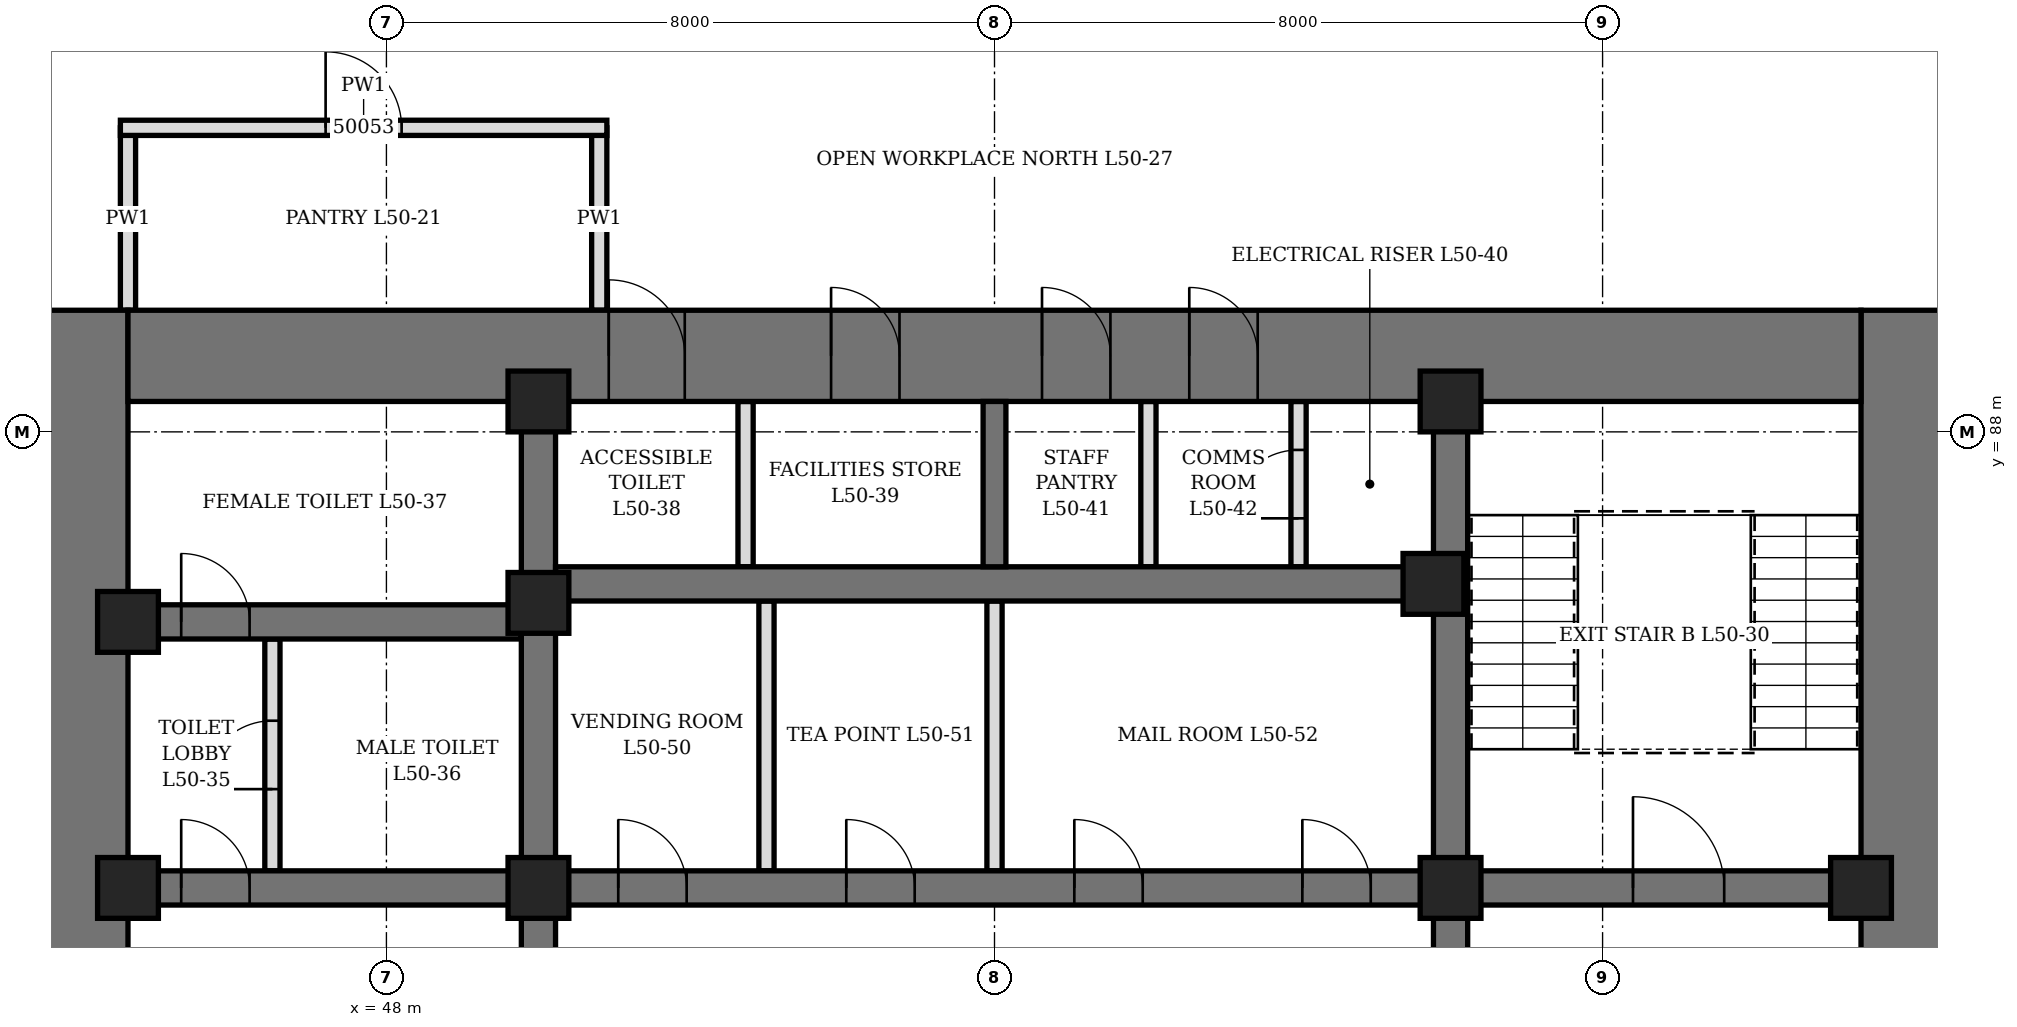
"""IFC4 building model, lengths in metres.
Left out: names, types, materials, properties, quantities, classifications, styles, units other than length and angle.
Written with IfcOpenShell. Run it as: python <this file> out.ifc"""

import sys

from ifc_helpers import new_model, si_unit, direction, frame, frame_2d, origin, origin_2d, place, context, subcontext, project, spatial, rectangle, hollow_rectangle, extrude, element, fill, save


model = new_model("IFC4")
c1 = context("Model", 3, precision=1e-05, world=origin(), true_north=direction((0.0, 1.0)))
c2 = subcontext(c1, "Body", "Model", "MODEL_VIEW")
j1 = project(units=[si_unit("LENGTHUNIT", "METRE"), si_unit("PLANEANGLEUNIT", "RADIAN")], contexts=[c1])
p1 = place(None, origin())
s1 = spatial("IfcSite", under=j1, at=p1, CompositionType="ELEMENT")
p2 = place(p1, origin())
s2 = spatial("IfcBuilding", under=s1, at=p2, CompositionType="ELEMENT")
p3 = place(p2, frame((0.0, 0.0, 223.3)))
s3 = spatial("IfcBuildingStorey", under=s2, at=p3, CompositionType="ELEMENT", Elevation=223.3)
p4 = place(p3, frame((44.0, 70.4, 0.0), z_axis=(0.0, 0.0, 1.0), x_axis=(0.0, 1.0, 0.0)))
e1 = element("IfcWall", 1, at=p4, inside=s3, PredefinedType="SHEAR", context=c2, shape_type="SweptSolid", body=[
    extrude(rectangle(XDim=19.2, YDim=1.2, at=frame_2d((9.6, 0.0))), origin(), (0.0, 0.0, 1.0), 4.2),
])
p5 = place(p4, frame((8.6, 0.0, 0.0)))
e2 = element("IfcOpeningElement", 2, at=p5, cuts=e1, PredefinedType="OPENING", context=c2, shape_type="SweptSolid", body=[
    extrude(rectangle(XDim=2.0, YDim=2.4, at=frame_2d((1.0, 1.2))), frame((0.0, 0.61, 0.0), z_axis=(0.0, -1.0, 0.0), x_axis=(1.0, 0.0, 0.0)), (0.0, 0.0, 1.0), 1.22),
])
p6 = place(p3, frame((68.0, 70.4, 0.0), z_axis=(0.0, 0.0, 1.0), x_axis=(0.0, 1.0, 0.0)))
e3 = element("IfcWall", 3, at=p6, inside=s3, PredefinedType="SHEAR", context=c2, shape_type="SweptSolid", body=[
    extrude(rectangle(XDim=19.2, YDim=1.2, at=frame_2d((9.6, 0.0))), origin(), (0.0, 0.0, 1.0), 4.2),
])
p7 = place(p6, frame((8.6, 0.0, 0.0)))
e4 = element("IfcOpeningElement", 4, at=p7, cuts=e3, PredefinedType="OPENING", context=c2, shape_type="SweptSolid", body=[
    extrude(rectangle(XDim=2.0, YDim=2.4, at=frame_2d((1.0, 1.2))), frame((0.0, 0.61, 0.0), z_axis=(0.0, -1.0, 0.0), x_axis=(1.0, 0.0, 0.0)), (0.0, 0.0, 1.0), 1.22),
])
p8 = place(p3, frame((44.6, 89.0, 0.0), z_axis=(0.0, 0.0, 1.0), x_axis=(1.0, 0.0, 0.0)))
e5 = element("IfcWall", 5, at=p8, inside=s3, PredefinedType="SHEAR", context=c2, shape_type="SweptSolid", body=[
    extrude(rectangle(XDim=22.8, YDim=1.2, at=frame_2d((11.4, 0.0))), origin(), (0.0, 0.0, 1.0), 4.2),
])
p9 = place(p8, frame((6.325, 0.0, 0.0)))
e6 = element("IfcOpeningElement", 6, at=p9, cuts=e5, PredefinedType="OPENING", context=c2, shape_type="SweptSolid", body=[
    extrude(rectangle(XDim=1.0, YDim=2.1, at=frame_2d((0.5, 1.05))), frame((0.0, 0.61, 0.0), z_axis=(0.0, -1.0, 0.0), x_axis=(1.0, 0.0, 0.0)), (0.0, 0.0, 1.0), 1.22),
])
p10 = place(p8, frame((9.25, 0.0, 0.0)))
e7 = element("IfcOpeningElement", 7, at=p10, cuts=e5, PredefinedType="OPENING", context=c2, shape_type="SweptSolid", body=[
    extrude(rectangle(XDim=0.9, YDim=2.1, at=frame_2d((0.45, 1.05))), frame((0.0, 0.61, 0.0), z_axis=(0.0, -1.0, 0.0), x_axis=(1.0, 0.0, 0.0)), (0.0, 0.0, 1.0), 1.22),
])
p11 = place(p8, frame((12.025, 0.0, 0.0)))
e8 = element("IfcOpeningElement", 8, at=p11, cuts=e5, PredefinedType="OPENING", context=c2, shape_type="SweptSolid", body=[
    extrude(rectangle(XDim=0.9, YDim=2.1, at=frame_2d((0.45, 1.05))), frame((0.0, 0.61, 0.0), z_axis=(0.0, -1.0, 0.0), x_axis=(1.0, 0.0, 0.0)), (0.0, 0.0, 1.0), 1.22),
])
p12 = place(p8, frame((13.962, 0.0, 0.0)))
e9 = element("IfcOpeningElement", 9, at=p12, cuts=e5, PredefinedType="OPENING", context=c2, shape_type="SweptSolid", body=[
    extrude(rectangle(XDim=0.9, YDim=2.1, at=frame_2d((0.45, 1.05))), frame((0.0, 0.61, 0.0), z_axis=(0.0, -1.0, 0.0), x_axis=(1.0, 0.0, 0.0)), (0.0, 0.0, 1.0), 1.22),
])
p13 = place(p3, frame((50.0, 71.6, 0.0), z_axis=(0.0, 0.0, 1.0), x_axis=(0.0, 1.0, 0.0)))
e10 = element("IfcWall", 10, at=p13, inside=s3, PredefinedType="SHEAR", context=c2, shape_type="SweptSolid", body=[
    extrude(rectangle(XDim=16.8, YDim=0.45, at=frame_2d((8.4, 0.0))), origin(), (0.0, 0.0, 1.0), 4.2),
])
p14 = place(p13, frame((7.5, 0.0, 0.0)))
e11 = element("IfcOpeningElement", 11, at=p14, cuts=e10, PredefinedType="OPENING", context=c2, shape_type="SweptSolid", body=[
    extrude(rectangle(XDim=1.8, YDim=2.4, at=frame_2d((0.9, 1.2))), frame((0.0, 0.235, 0.0), z_axis=(0.0, -1.0, 0.0), x_axis=(1.0, 0.0, 0.0)), (0.0, 0.0, 1.0), 0.47),
])
p15 = place(p3, frame((62.0, 71.6, 0.0), z_axis=(0.0, 0.0, 1.0), x_axis=(0.0, 1.0, 0.0)))
e12 = element("IfcWall", 12, at=p15, inside=s3, PredefinedType="SHEAR", context=c2, shape_type="SweptSolid", body=[
    extrude(rectangle(XDim=16.8, YDim=0.45, at=frame_2d((8.4, 0.0))), origin(), (0.0, 0.0, 1.0), 4.2),
])
p16 = place(p15, frame((7.5, 0.0, 0.0)))
e13 = element("IfcOpeningElement", 13, at=p16, cuts=e12, PredefinedType="OPENING", context=c2, shape_type="SweptSolid", body=[
    extrude(rectangle(XDim=1.8, YDim=2.4, at=frame_2d((0.9, 1.2))), frame((0.0, 0.235, 0.0), z_axis=(0.0, -1.0, 0.0), x_axis=(1.0, 0.0, 0.0)), (0.0, 0.0, 1.0), 0.47),
])
p17 = place(p3, frame((44.6, 82.0, 0.0), z_axis=(0.0, 0.0, 1.0), x_axis=(1.0, 0.0, 0.0)))
e14 = element("IfcWall", 14, at=p17, inside=s3, PredefinedType="SHEAR", context=c2, shape_type="SweptSolid", body=[
    extrude(rectangle(XDim=5.175, YDim=0.45, at=frame_2d((2.587, 0.0))), origin(), (0.0, 0.0, 1.0), 4.2),
])
p18 = place(p17, frame((0.7, 0.0, 0.0)))
e15 = element("IfcOpeningElement", 15, at=p18, cuts=e14, PredefinedType="OPENING", context=c2, shape_type="SweptSolid", body=[
    extrude(rectangle(XDim=0.9, YDim=2.1, at=frame_2d((0.45, 1.05))), frame((0.0, 0.235, 0.0), z_axis=(0.0, -1.0, 0.0), x_axis=(1.0, 0.0, 0.0)), (0.0, 0.0, 1.0), 0.47),
])
p19 = place(p3, frame((44.6, 85.5, 0.0), z_axis=(0.0, 0.0, 1.0), x_axis=(1.0, 0.0, 0.0)))
e16 = element("IfcWall", 16, at=p19, inside=s3, PredefinedType="SHEAR", context=c2, shape_type="SweptSolid", body=[
    extrude(rectangle(XDim=5.175, YDim=0.45, at=frame_2d((2.587, 0.0))), origin(), (0.0, 0.0, 1.0), 4.2),
])
p20 = place(p19, frame((0.7, 0.0, 0.0)))
e17 = element("IfcOpeningElement", 17, at=p20, cuts=e16, PredefinedType="OPENING", context=c2, shape_type="SweptSolid", body=[
    extrude(rectangle(XDim=0.9, YDim=2.1, at=frame_2d((0.45, 1.05))), frame((0.0, 0.235, 0.0), z_axis=(0.0, -1.0, 0.0), x_axis=(1.0, 0.0, 0.0)), (0.0, 0.0, 1.0), 0.47),
])
p21 = place(p3, frame((62.225, 82.0, 0.0), z_axis=(0.0, 0.0, 1.0), x_axis=(1.0, 0.0, 0.0)))
e18 = element("IfcWall", 18, at=p21, inside=s3, PredefinedType="SHEAR", context=c2, shape_type="SweptSolid", body=[
    extrude(rectangle(XDim=5.175, YDim=0.45, at=frame_2d((2.587, 0.0))), origin(), (0.0, 0.0, 1.0), 4.2),
])
p22 = place(p21, frame((2.175, 0.0, 0.0)))
e19 = element("IfcOpeningElement", 19, at=p22, cuts=e18, PredefinedType="OPENING", context=c2, shape_type="SweptSolid", body=[
    extrude(rectangle(XDim=1.2, YDim=2.1, at=frame_2d((0.6, 1.05))), frame((0.0, 0.235, 0.0), z_axis=(0.0, -1.0, 0.0), x_axis=(1.0, 0.0, 0.0)), (0.0, 0.0, 1.0), 0.47),
])
p23 = place(p3, frame((50.225, 82.0, 0.0), z_axis=(0.0, 0.0, 1.0), x_axis=(1.0, 0.0, 0.0)))
e20 = element("IfcWall", 20, at=p23, inside=s3, PredefinedType="SHEAR", context=c2, shape_type="SweptSolid", body=[
    extrude(rectangle(XDim=11.55, YDim=0.45, at=frame_2d((5.775, 0.0))), origin(), (0.0, 0.0, 1.0), 4.2),
])
p24 = place(p23, frame((0.825, 0.0, 0.0)))
e21 = element("IfcOpeningElement", 21, at=p24, cuts=e20, PredefinedType="OPENING", context=c2, shape_type="SweptSolid", body=[
    extrude(rectangle(XDim=0.9, YDim=2.1, at=frame_2d((0.45, 1.05))), frame((0.0, 0.235, 0.0), z_axis=(0.0, -1.0, 0.0), x_axis=(1.0, 0.0, 0.0)), (0.0, 0.0, 1.0), 0.47),
])
p25 = place(p23, frame((3.825, 0.0, 0.0)))
e22 = element("IfcOpeningElement", 22, at=p25, cuts=e20, PredefinedType="OPENING", context=c2, shape_type="SweptSolid", body=[
    extrude(rectangle(XDim=0.9, YDim=2.1, at=frame_2d((0.45, 1.05))), frame((0.0, 0.235, 0.0), z_axis=(0.0, -1.0, 0.0), x_axis=(1.0, 0.0, 0.0)), (0.0, 0.0, 1.0), 0.47),
])
p26 = place(p23, frame((6.825, 0.0, 0.0)))
e23 = element("IfcOpeningElement", 23, at=p26, cuts=e20, PredefinedType="OPENING", context=c2, shape_type="SweptSolid", body=[
    extrude(rectangle(XDim=0.9, YDim=2.1, at=frame_2d((0.45, 1.05))), frame((0.0, 0.235, 0.0), z_axis=(0.0, -1.0, 0.0), x_axis=(1.0, 0.0, 0.0)), (0.0, 0.0, 1.0), 0.47),
])
p27 = place(p23, frame((9.825, 0.0, 0.0)))
e24 = element("IfcOpeningElement", 24, at=p27, cuts=e20, PredefinedType="OPENING", context=c2, shape_type="SweptSolid", body=[
    extrude(rectangle(XDim=0.9, YDim=2.1, at=frame_2d((0.45, 1.05))), frame((0.0, 0.235, 0.0), z_axis=(0.0, -1.0, 0.0), x_axis=(1.0, 0.0, 0.0)), (0.0, 0.0, 1.0), 0.47),
])
p28 = place(p3, frame((50.225, 86.0, 0.0), z_axis=(0.0, 0.0, 1.0), x_axis=(1.0, 0.0, 0.0)))
e25 = element("IfcWall", 25, at=p28, inside=s3, PredefinedType="SHEAR", context=c2, shape_type="SweptSolid", body=[
    extrude(rectangle(XDim=11.55, YDim=0.45, at=frame_2d((5.775, 0.0))), origin(), (0.0, 0.0, 1.0), 4.2),
])
p29 = place(p3, frame((56.0, 86.225, 0.0), z_axis=(0.0, 0.0, 1.0), x_axis=(0.0, 1.0, 0.0)))
e26 = element("IfcWall", 26, at=p29, inside=s3, PredefinedType="SHEAR", context=c2, shape_type="SweptSolid", body=[
    extrude(rectangle(XDim=2.175, YDim=0.3, at=frame_2d((1.087, 0.0))), origin(), (0.0, 0.0, 1.0), 4.2),
])
for number, where, z_axis, x_axis in (
    (27, (44.6, 82.0, 0.0), (0.0, 0.0, 1.0), (1.0, 0.0, 0.0)),
    (28, (44.6, 85.5, 0.0), (0.0, 0.0, 1.0), (1.0, 0.0, 0.0)),
    (29, (50.0, 82.0, 0.0), (0.0, 0.0, 1.0), (1.0, 0.0, 0.0)),
    (30, (50.0, 85.75, 0.0), (0.0, 0.0, 1.0), (1.0, 0.0, 0.0)),
    (31, (50.0, 88.4, 0.0), (0.0, 0.0, 1.0), (1.0, 0.0, 0.0)),
    (32, (61.775, 86.0, 0.0), (0.0, 0.0, 1.0), (1.0, 0.0, 0.0)),
    (33, (62.0, 82.0, 0.0), (0.0, 0.0, 1.0), (1.0, 0.0, 0.0)),
    (34, (62.0, 88.4, 0.0), (0.0, 0.0, 1.0), (1.0, 0.0, 0.0)),
    (35, (67.4, 82.0, 0.0), (0.0, 0.0, 1.0), (1.0, 0.0, 0.0)),
):
    element("IfcColumn", number, at=place(p3, frame(where, z_axis=z_axis, x_axis=x_axis)), inside=s3, PredefinedType="COLUMN", context=c2, shape_type="SweptSolid", body=[
        extrude(hollow_rectangle(XDim=0.8, YDim=0.8, WallThickness=0.1, at=origin_2d()), origin(), (0.0, 0.0, 1.0), 4.2),
    ])
p30 = place(p3, frame((46.5, 82.225, 0.0), z_axis=(0.0, 0.0, 1.0), x_axis=(0.0, 1.0, 0.0)))
e36 = element("IfcWall", 36, at=p30, inside=s3, PredefinedType="PARTITIONING", context=c2, shape_type="SweptSolid", body=[
    extrude(rectangle(XDim=3.05, YDim=0.2, at=frame_2d((1.525, 0.0))), origin(), (0.0, 0.0, 1.0), 4.04),
])
p31 = place(p30, frame((1.075, 0.0, 0.0)))
e37 = element("IfcOpeningElement", 37, at=p31, cuts=e36, PredefinedType="OPENING", context=c2, shape_type="SweptSolid", body=[
    extrude(rectangle(XDim=0.9, YDim=2.1, at=frame_2d((0.45, 1.05))), frame((0.0, 0.11, 0.0), z_axis=(0.0, -1.0, 0.0), x_axis=(1.0, 0.0, 0.0)), (0.0, 0.0, 1.0), 0.22),
])
p32 = place(p3, frame((52.725, 86.225, 0.0), z_axis=(0.0, 0.0, 1.0), x_axis=(0.0, 1.0, 0.0)))
e38 = element("IfcWall", 38, at=p32, inside=s3, PredefinedType="PARTITIONING", context=c2, shape_type="SweptSolid", body=[
    extrude(rectangle(XDim=2.175, YDim=0.2, at=frame_2d((1.087, 0.0))), origin(), (0.0, 0.0, 1.0), 4.04),
])
p33 = place(p3, frame((60.0, 86.225, 0.0), z_axis=(0.0, 0.0, 1.0), x_axis=(0.0, 1.0, 0.0)))
e39 = element("IfcWall", 39, at=p33, inside=s3, PredefinedType="PARTITIONING", context=c2, shape_type="SweptSolid", body=[
    extrude(rectangle(XDim=2.175, YDim=0.2, at=frame_2d((1.087, 0.0))), origin(), (0.0, 0.0, 1.0), 4.04),
])
p34 = place(p33, frame((0.637, 0.0, 0.0)))
e40 = element("IfcOpeningElement", 40, at=p34, cuts=e39, PredefinedType="OPENING", context=c2, shape_type="SweptSolid", body=[
    extrude(rectangle(XDim=0.9, YDim=2.1, at=frame_2d((0.45, 1.05))), frame((0.0, 0.11, 0.0), z_axis=(0.0, -1.0, 0.0), x_axis=(1.0, 0.0, 0.0)), (0.0, 0.0, 1.0), 0.22),
])
p35 = place(p3, frame((58.025, 86.225, 0.0), z_axis=(0.0, 0.0, 1.0), x_axis=(0.0, 1.0, 0.0)))
e41 = element("IfcWall", 41, at=p35, inside=s3, PredefinedType="PARTITIONING", context=c2, shape_type="SweptSolid", body=[
    extrude(rectangle(XDim=2.175, YDim=0.2, at=frame_2d((1.087, 0.0))), origin(), (0.0, 0.0, 1.0), 4.04),
])
p36 = place(p3, frame((53.0, 82.225, 0.0), z_axis=(0.0, 0.0, 1.0), x_axis=(0.0, 1.0, 0.0)))
e42 = element("IfcWall", 42, at=p36, inside=s3, PredefinedType="PARTITIONING", context=c2, shape_type="SweptSolid", body=[
    extrude(rectangle(XDim=3.55, YDim=0.2, at=frame_2d((1.775, 0.0))), origin(), (0.0, 0.0, 1.0), 4.04),
])
p37 = place(p3, frame((56.0, 82.225, 0.0), z_axis=(0.0, 0.0, 1.0), x_axis=(0.0, 1.0, 0.0)))
e43 = element("IfcWall", 43, at=p37, inside=s3, PredefinedType="PARTITIONING", context=c2, shape_type="SweptSolid", body=[
    extrude(rectangle(XDim=3.55, YDim=0.2, at=frame_2d((1.775, 0.0))), origin(), (0.0, 0.0, 1.0), 3.14),
])
for number, where, z_axis, x_axis in (
    (44, (44.6, 89.6, 0.0), (0.0, 0.0, 1.0), (0.0, 1.0, 0.0)),
    (45, (50.8, 89.6, 0.0), (0.0, 0.0, 1.0), (0.0, 1.0, 0.0)),
):
    element("IfcWall", number, at=place(p3, frame(where, z_axis=z_axis, x_axis=x_axis)), inside=s3, PredefinedType="PARTITIONING", context=c2, shape_type="SweptSolid", body=[
        extrude(rectangle(XDim=2.4, YDim=0.2, at=frame_2d((1.2, 0.0))), origin(), (0.0, 0.0, 1.0), 4.04),
    ])
p38 = place(p3, frame((44.5, 92.0, 0.0), z_axis=(0.0, 0.0, 1.0), x_axis=(1.0, 0.0, 0.0)))
e46 = element("IfcWall", 46, at=p38, inside=s3, PredefinedType="PARTITIONING", context=c2, shape_type="SweptSolid", body=[
    extrude(rectangle(XDim=6.4, YDim=0.2, at=frame_2d((3.2, 0.0))), origin(), (0.0, 0.0, 1.0), 4.04),
])
p39 = place(p38, frame((2.7, 0.0, 0.0)))
e47 = element("IfcOpeningElement", 47, at=p39, cuts=e46, PredefinedType="OPENING", context=c2, shape_type="SweptSolid", body=[
    extrude(rectangle(XDim=1.0, YDim=2.1, at=frame_2d((0.5, 1.05))), frame((0.0, 0.11, 0.0), z_axis=(0.0, -1.0, 0.0), x_axis=(1.0, 0.0, 0.0)), (0.0, 0.0, 1.0), 0.22),
])
p40 = place(p18, origin())
e48 = element("IfcDoor", 48, at=p40, inside=s3, OperationType="SINGLE_SWING_LEFT", PredefinedType="DOOR", context=c2, shape_type="SweptSolid", body=[
    extrude(rectangle(XDim=0.9, YDim=2.1, at=frame_2d((0.45, 1.05))), frame((0.0, 0.225, 0.0), z_axis=(0.0, -1.0, 0.0), x_axis=(1.0, 0.0, 0.0)), (0.0, 0.0, 1.0), 0.449),
])
fill(e15, e48)
p41 = place(p31, origin())
e49 = element("IfcDoor", 49, at=p41, inside=s3, OperationType="SINGLE_SWING_RIGHT", PredefinedType="DOOR", context=c2, shape_type="SweptSolid", body=[
    extrude(rectangle(XDim=0.9, YDim=2.1, at=frame_2d((0.45, 1.05))), frame((0.0, 0.1, 0.0), z_axis=(0.0, -1.0, 0.0), x_axis=(1.0, 0.0, 0.0)), (0.0, 0.0, 1.0), 0.199),
])
fill(e37, e49)
p42 = place(p20, origin())
e50 = element("IfcDoor", 50, at=p42, inside=s3, OperationType="SINGLE_SWING_RIGHT", PredefinedType="DOOR", context=c2, shape_type="SweptSolid", body=[
    extrude(rectangle(XDim=0.9, YDim=2.1, at=frame_2d((0.45, 1.05))), frame((0.0, 0.225, 0.0), z_axis=(0.0, -1.0, 0.0), x_axis=(1.0, 0.0, 0.0)), (0.0, 0.0, 1.0), 0.449),
])
fill(e17, e50)
p43 = place(p9, origin())
e51 = element("IfcDoor", 51, at=p43, inside=s3, OperationType="SINGLE_SWING_LEFT", PredefinedType="DOOR", context=c2, shape_type="SweptSolid", body=[
    extrude(rectangle(XDim=1.0, YDim=2.1, at=frame_2d((0.5, 1.05))), frame((0.0, 0.35, 0.0), z_axis=(0.0, -1.0, 0.0), x_axis=(1.0, 0.0, 0.0)), (0.0, 0.0, 1.0), 0.7),
])
fill(e6, e51)
p44 = place(p10, origin())
e52 = element("IfcDoor", 52, at=p44, inside=s3, OperationType="SINGLE_SWING_LEFT", PredefinedType="DOOR", context=c2, shape_type="SweptSolid", body=[
    extrude(rectangle(XDim=0.9, YDim=2.1, at=frame_2d((0.45, 1.05))), frame((0.0, 0.35, 0.0), z_axis=(0.0, -1.0, 0.0), x_axis=(1.0, 0.0, 0.0)), (0.0, 0.0, 1.0), 0.7),
])
fill(e7, e52)
p45 = place(p11, origin())
e53 = element("IfcDoor", 53, at=p45, inside=s3, OperationType="SINGLE_SWING_LEFT", PredefinedType="DOOR", context=c2, shape_type="SweptSolid", body=[
    extrude(rectangle(XDim=0.9, YDim=2.1, at=frame_2d((0.45, 1.05))), frame((0.0, 0.35, 0.0), z_axis=(0.0, -1.0, 0.0), x_axis=(1.0, 0.0, 0.0)), (0.0, 0.0, 1.0), 0.7),
])
fill(e8, e53)
p46 = place(p12, origin())
e54 = element("IfcDoor", 54, at=p46, inside=s3, OperationType="SINGLE_SWING_LEFT", PredefinedType="DOOR", context=c2, shape_type="SweptSolid", body=[
    extrude(rectangle(XDim=0.9, YDim=2.1, at=frame_2d((0.45, 1.05))), frame((0.0, 0.35, 0.0), z_axis=(0.0, -1.0, 0.0), x_axis=(1.0, 0.0, 0.0)), (0.0, 0.0, 1.0), 0.7),
])
fill(e9, e54)
p47 = place(p34, origin())
e55 = element("IfcDoor", 55, at=p47, inside=s3, OperationType="SINGLE_SWING_LEFT", PredefinedType="DOOR", context=c2, shape_type="SweptSolid", body=[
    extrude(rectangle(XDim=0.9, YDim=2.1, at=frame_2d((0.45, 1.05))), frame((0.0, 0.1, 0.0), z_axis=(0.0, -1.0, 0.0), x_axis=(1.0, 0.0, 0.0)), (0.0, 0.0, 1.0), 0.199),
])
fill(e40, e55)
p48 = place(p24, origin())
e56 = element("IfcDoor", 56, at=p48, inside=s3, OperationType="SINGLE_SWING_LEFT", PredefinedType="DOOR", context=c2, shape_type="SweptSolid", body=[
    extrude(rectangle(XDim=0.9, YDim=2.1, at=frame_2d((0.45, 1.05))), frame((0.0, 0.225, 0.0), z_axis=(0.0, -1.0, 0.0), x_axis=(1.0, 0.0, 0.0)), (0.0, 0.0, 1.0), 0.449),
])
fill(e21, e56)
p49 = place(p25, origin())
e57 = element("IfcDoor", 57, at=p49, inside=s3, OperationType="SINGLE_SWING_LEFT", PredefinedType="DOOR", context=c2, shape_type="SweptSolid", body=[
    extrude(rectangle(XDim=0.9, YDim=2.1, at=frame_2d((0.45, 1.05))), frame((0.0, 0.225, 0.0), z_axis=(0.0, -1.0, 0.0), x_axis=(1.0, 0.0, 0.0)), (0.0, 0.0, 1.0), 0.449),
])
fill(e22, e57)
p50 = place(p26, origin())
e58 = element("IfcDoor", 58, at=p50, inside=s3, OperationType="SINGLE_SWING_LEFT", PredefinedType="DOOR", context=c2, shape_type="SweptSolid", body=[
    extrude(rectangle(XDim=0.9, YDim=2.1, at=frame_2d((0.45, 1.05))), frame((0.0, 0.225, 0.0), z_axis=(0.0, -1.0, 0.0), x_axis=(1.0, 0.0, 0.0)), (0.0, 0.0, 1.0), 0.449),
])
fill(e23, e58)
p51 = place(p27, origin())
e59 = element("IfcDoor", 59, at=p51, inside=s3, OperationType="SINGLE_SWING_LEFT", PredefinedType="DOOR", context=c2, shape_type="SweptSolid", body=[
    extrude(rectangle(XDim=0.9, YDim=2.1, at=frame_2d((0.45, 1.05))), frame((0.0, 0.225, 0.0), z_axis=(0.0, -1.0, 0.0), x_axis=(1.0, 0.0, 0.0)), (0.0, 0.0, 1.0), 0.449),
])
fill(e24, e59)
p52 = place(p22, origin())
e60 = element("IfcDoor", 60, at=p52, inside=s3, OperationType="SINGLE_SWING_LEFT", PredefinedType="DOOR", context=c2, shape_type="SweptSolid", body=[
    extrude(rectangle(XDim=1.2, YDim=2.1, at=frame_2d((0.6, 1.05))), frame((0.0, 0.225, 0.0), z_axis=(0.0, -1.0, 0.0), x_axis=(1.0, 0.0, 0.0)), (0.0, 0.0, 1.0), 0.449),
])
fill(e19, e60)
p53 = place(p39, origin())
e61 = element("IfcDoor", 61, at=p53, inside=s3, OperationType="SINGLE_SWING_LEFT", PredefinedType="DOOR", context=c2, shape_type="SweptSolid", body=[
    extrude(rectangle(XDim=1.0, YDim=2.1, at=frame_2d((0.5, 1.05))), frame((0.0, 0.1, 0.0), z_axis=(0.0, -1.0, 0.0), x_axis=(1.0, 0.0, 0.0)), (0.0, 0.0, 1.0), 0.199),
])
fill(e47, e61)
save(model, sys.argv[1])
